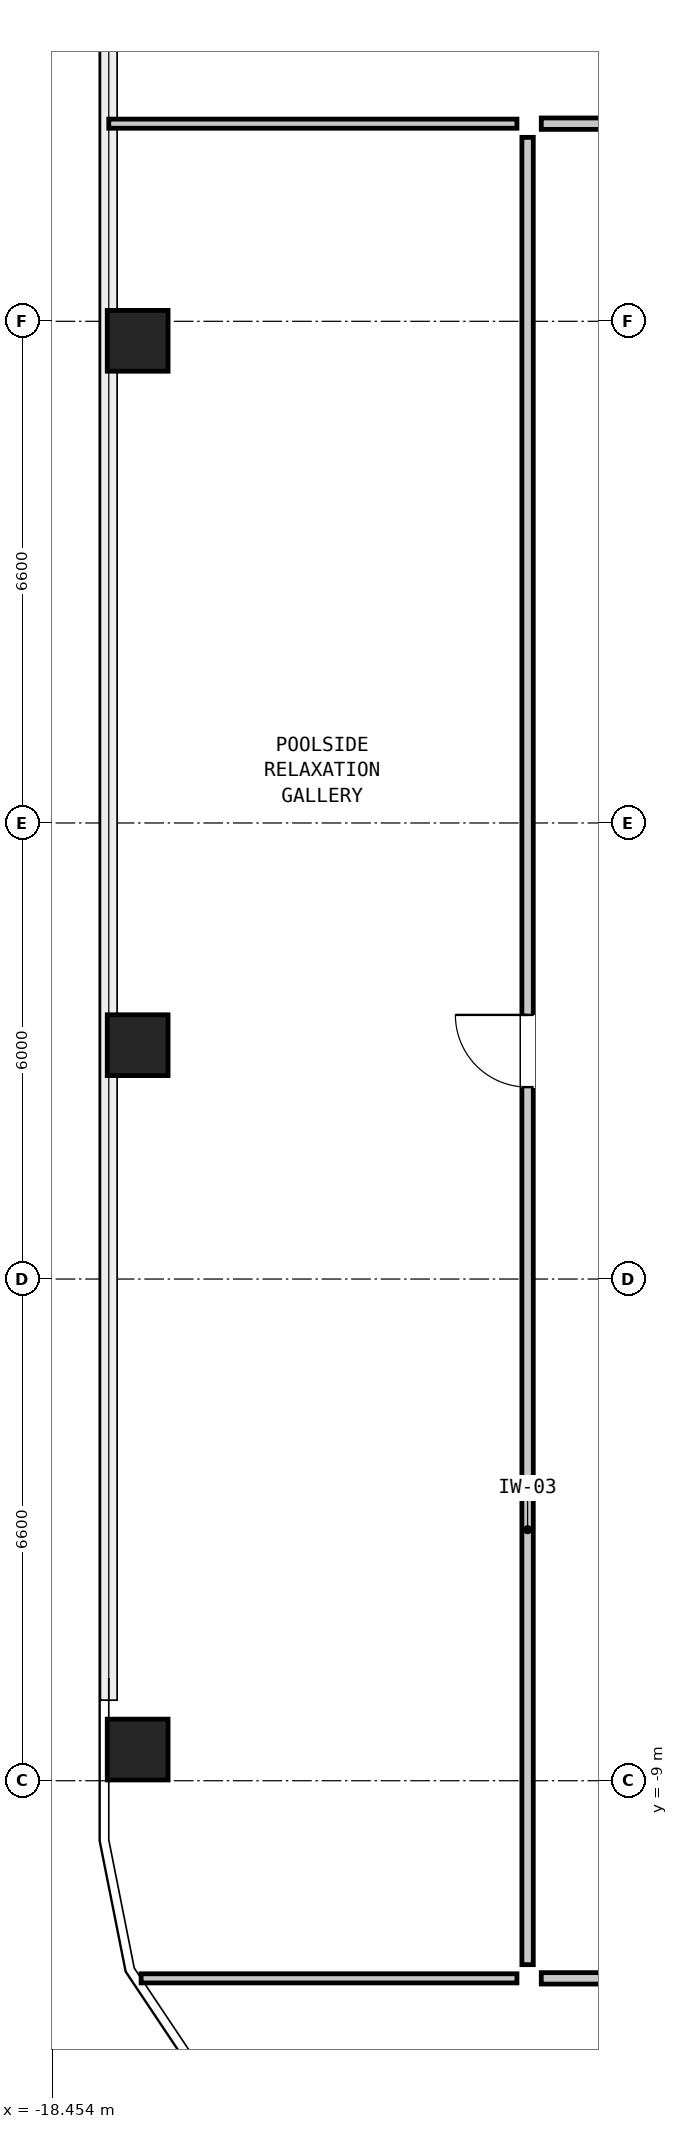
"""IFC4 building model, lengths in metres.
Left out: names, types, materials, properties, quantities, classifications, styles, units other than length and angle.
Written with IfcOpenShell. Run it as: python <this file> out.ifc"""

import sys

from ifc_helpers import new_model, si_unit, direction, frame, frame_2d, origin, origin_2d, place, context, subcontext, project, spatial, rectangle, hollow_rectangle, extrude, element, fill, save


model = new_model("IFC4")
c1 = context("Model", 3, precision=1e-05, world=origin(), true_north=direction((0.0, 1.0)))
c2 = subcontext(c1, "Body", "Model", "MODEL_VIEW")
j1 = project(units=[si_unit("LENGTHUNIT", "METRE"), si_unit("PLANEANGLEUNIT", "RADIAN")], contexts=[c1])
p1 = place(None, origin())
s1 = spatial("IfcSite", under=j1, at=p1, CompositionType="ELEMENT")
p2 = place(p1, origin())
s2 = spatial("IfcBuilding", under=s1, at=p2, CompositionType="ELEMENT")
p3 = place(p2, frame((0.0, 0.0, 104.85)))
s3 = spatial("IfcBuildingStorey", under=s2, at=p3, CompositionType="ELEMENT", Elevation=104.85)
for number, where, z_axis, x_axis in (
    (1, (-17.33, 9.943, 0.0), (0.0, 0.0, 1.0), (0.0, 1.0, 0.0)),
    (2, (-17.33, 0.677, 0.0), (0.0, 0.0, 1.0), (0.0, 1.0, 0.0)),
    (3, (-17.33, -8.59, 0.0), (0.0, 0.0, 1.0), (0.0, 1.0, 0.0)),
):
    element("IfcColumn", number, at=place(p3, frame(where, z_axis=z_axis, x_axis=x_axis)), inside=s3, PredefinedType="COLUMN", context=c2, shape_type="SweptSolid", body=[
        extrude(hollow_rectangle(XDim=0.8, YDim=0.8, WallThickness=0.05, at=origin_2d()), origin(), (0.0, 0.0, 1.0), 3.6),
    ])
p4 = place(p3, frame((-17.71, 12.8, 0.0), z_axis=(0.0, 0.0, 1.0), x_axis=(1.0, 0.0, 0.0)))
e4 = element("IfcWall", 4, at=p4, inside=s3, PredefinedType="PARTITIONING", context=c2, shape_type="SweptSolid", body=[
    extrude(rectangle(XDim=5.37, YDim=0.12, at=frame_2d((2.685, 0.0))), origin(), (0.0, 0.0, 1.0), 3.22),
])
p5 = place(p3, frame((-17.284, -11.6, 0.0), z_axis=(0.0, 0.0, 1.0), x_axis=(1.0, 0.0, 0.0)))
e5 = element("IfcWall", 5, at=p5, inside=s3, PredefinedType="PARTITIONING", context=c2, shape_type="SweptSolid", body=[
    extrude(rectangle(XDim=4.944, YDim=0.12, at=frame_2d((2.472, 0.0))), origin(), (0.0, 0.0, 1.0), 2.438),
])
p6 = place(p3, frame((-12.02, 12.8, 0.0), z_axis=(0.0, 0.0, 1.0), x_axis=(1.0, 0.0, 0.0)))
e6 = element("IfcWall", 6, at=p6, inside=s3, PredefinedType="PARTITIONING", context=c2, shape_type="SweptSolid", body=[
    extrude(rectangle(XDim=8.64, YDim=0.15, at=frame_2d((4.32, 0.0))), origin(), (0.0, 0.0, 1.0), 3.22),
])
p7 = place(p6, frame((3.845, 0.0, 0.0)))
e7 = element("IfcOpeningElement", 7, at=p7, cuts=e6, PredefinedType="OPENING", context=c2, shape_type="SweptSolid", body=[
    extrude(rectangle(XDim=0.95, YDim=2.1, at=frame_2d((0.475, 1.05))), frame((0.0, 0.087, 0.0), z_axis=(0.0, -1.0, 0.0), x_axis=(1.0, 0.0, 0.0)), (0.0, 0.0, 1.0), 0.174),
])
p8 = place(p3, frame((-12.02, -11.6, 0.0), z_axis=(0.0, 0.0, 1.0), x_axis=(1.0, 0.0, 0.0)))
e8 = element("IfcWall", 8, at=p8, inside=s3, PredefinedType="PARTITIONING", context=c2, shape_type="SweptSolid", body=[
    extrude(rectangle(XDim=7.64, YDim=0.15, at=frame_2d((3.82, 0.0))), origin(), (0.0, 0.0, 1.0), 2.438),
])
p9 = place(p8, frame((3.345, 0.0, 0.0)))
e9 = element("IfcOpeningElement", 9, at=p9, cuts=e8, PredefinedType="OPENING", context=c2, shape_type="SweptSolid", body=[
    extrude(rectangle(XDim=0.95, YDim=2.1, at=frame_2d((0.475, 1.05))), frame((0.0, 0.087, 0.0), z_axis=(0.0, -1.0, 0.0), x_axis=(1.0, 0.0, 0.0)), (0.0, 0.0, 1.0), 0.174),
])
p10 = place(p3, frame((-12.2, -11.42, 0.0), z_axis=(0.0, 0.0, 1.0), x_axis=(0.0, 1.0, 0.0)))
e10 = element("IfcWall", 10, at=p10, inside=s3, PredefinedType="PARTITIONING", context=c2, shape_type="SweptSolid", body=[
    extrude(rectangle(XDim=24.04, YDim=0.15, at=frame_2d((12.02, 0.0))), origin(), (0.0, 0.0, 1.0), 3.22),
])
p11 = place(p10, frame((11.545, 0.0, 0.0)))
e11 = element("IfcOpeningElement", 11, at=p11, cuts=e10, PredefinedType="OPENING", context=c2, shape_type="SweptSolid", body=[
    extrude(rectangle(XDim=0.95, YDim=2.1, at=frame_2d((0.475, 1.05))), frame((0.0, 0.087, 0.0), z_axis=(0.0, -1.0, 0.0), x_axis=(1.0, 0.0, 0.0)), (0.0, 0.0, 1.0), 0.174),
])
p12 = place(p11, origin())
e12 = element("IfcDoor", 12, at=p12, inside=s3, OperationType="SINGLE_SWING_RIGHT", PredefinedType="DOOR", context=c2, shape_type="SweptSolid", body=[
    extrude(rectangle(XDim=0.95, YDim=2.1, at=frame_2d((0.475, 1.05))), frame((0.0, 0.025, 0.0), z_axis=(0.0, -1.0, 0.0), x_axis=(1.0, 0.0, 0.0)), (0.0, 0.0, 1.0), 0.05),
])
fill(e11, e12)
save(model, sys.argv[1])
